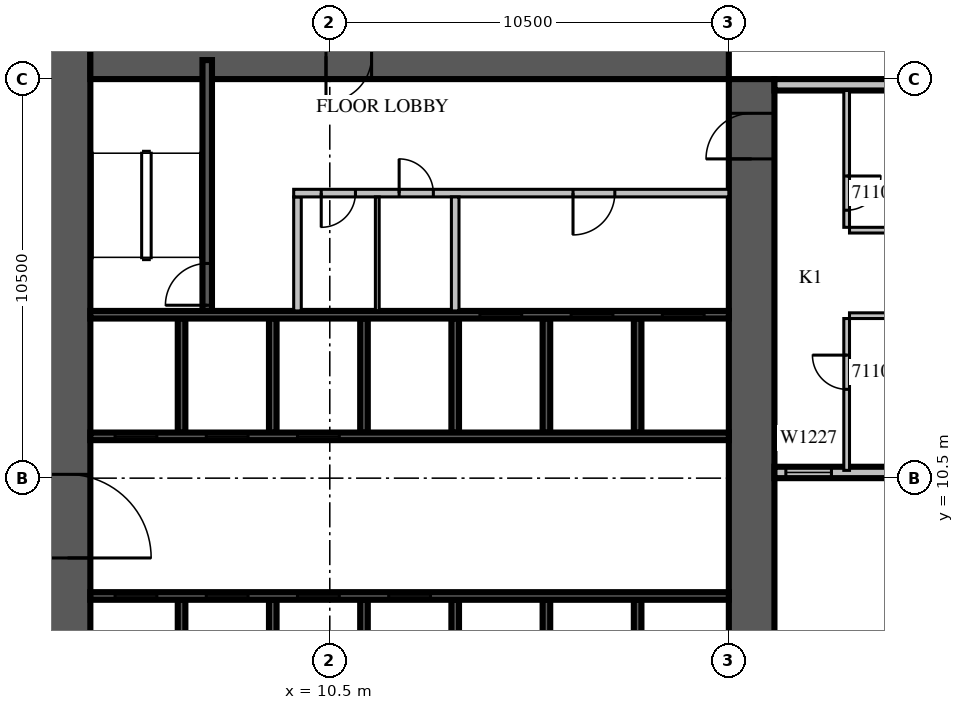
"""IFC4 building model, lengths in metres.
Left out: names, types, materials, properties, quantities, classifications, styles, units other than length and angle.
Written with IfcOpenShell. Run it as: python <this file> out.ifc"""

import sys

from ifc_helpers import new_model, si_unit, direction, frame, frame_2d, origin, place, context, subcontext, project, spatial, rectangle, extrude, source, transform, mapped, element, fill, save


model = new_model("IFC4")
c1 = context("Model", 3, precision=1e-05, world=origin(), true_north=direction((0.0, 1.0)))
c2 = subcontext(c1, "Body", "Model", "MODEL_VIEW")
j1 = project(units=[si_unit("LENGTHUNIT", "METRE"), si_unit("PLANEANGLEUNIT", "RADIAN")], contexts=[c1])
p1 = place(None, origin())
s1 = spatial("IfcSite", under=j1, at=p1, CompositionType="ELEMENT")
p2 = place(p1, origin())
s2 = spatial("IfcBuilding", under=s1, at=p2, CompositionType="ELEMENT")
p3 = place(p2, frame((0.0, 0.0, 57.3)))
s3 = spatial("IfcBuildingStorey", under=s2, at=p3, CompositionType="ELEMENT", Elevation=57.3)
m1 = source(origin(), c2, "Body", "SweptSolid", [
    extrude(rectangle(XDim=18.0, YDim=1.2, at=frame_2d((9.0, 0.0))), origin(), (0.0, 0.0, 1.0), 4.2),
])
p4 = place(p3, frame((3.6, 4.2, 0.0), z_axis=(0.0, 0.0, 1.0), x_axis=(0.0, 1.0, 0.0)))
e1 = element("IfcWall", 1, at=p4, inside=s3, PredefinedType="SHEAR", context=c2, shape_type="MappedRepresentation", body=[
    mapped(m1, transform((0.0, 0.0, 0.0), scale=1.0)),
])
m2 = source(origin(), c2, "Body", "SweptSolid", [
    extrude(rectangle(XDim=2.2, YDim=2.1, at=frame_2d((1.1, 1.05))), frame((0.0, 0.61, 0.0), z_axis=(0.0, -1.0, 0.0), x_axis=(1.0, 0.0, 0.0)), (0.0, 0.0, 1.0), 1.22),
])
p5 = place(p4, frame((4.2, 0.0, 0.0)))
e2 = element("IfcOpeningElement", 2, at=p5, cuts=e1, PredefinedType="OPENING", context=c2, shape_type="MappedRepresentation", body=[
    mapped(m2, transform((0.0, 0.0, 0.0), scale=1.0)),
])
m3 = source(origin(), c2, "Body", "SweptSolid", [
    extrude(rectangle(XDim=16.8, YDim=1.2, at=frame_2d((8.4, 0.0))), origin(), (0.0, 0.0, 1.0), 4.2),
])
p6 = place(p3, frame((21.6, 4.2, 0.0), z_axis=(0.0, 0.0, 1.0), x_axis=(0.0, 1.0, 0.0)))
e3 = element("IfcWall", 3, at=p6, inside=s3, PredefinedType="SHEAR", context=c2, shape_type="MappedRepresentation", body=[
    mapped(m3, transform((0.0, 0.0, 0.0), scale=1.0)),
])
m4 = source(origin(), c2, "Body", "SweptSolid", [
    extrude(rectangle(XDim=1.2, YDim=2.1, at=frame_2d((0.6, 1.05))), frame((0.0, 0.61, 0.0), z_axis=(0.0, -1.0, 0.0), x_axis=(1.0, 0.0, 0.0)), (0.0, 0.0, 1.0), 1.22),
])
p7 = place(p6, frame((14.7, 0.0, 0.0)))
e4 = element("IfcOpeningElement", 4, at=p7, cuts=e3, PredefinedType="OPENING", context=c2, shape_type="MappedRepresentation", body=[
    mapped(m4, transform((0.0, 0.0, 0.0), scale=1.0)),
])
p8 = place(p3, frame((4.2, 21.6, 0.0), z_axis=(0.0, 0.0, 1.0), x_axis=(1.0, 0.0, 0.0)))
e5 = element("IfcWall", 5, at=p8, inside=s3, PredefinedType="SHEAR", context=c2, shape_type="MappedRepresentation", body=[
    mapped(m3, transform((0.0, 0.0, 0.0), scale=1.0)),
])
p9 = place(p8, frame((6.2, 0.0, 0.0)))
e6 = element("IfcOpeningElement", 6, at=p9, cuts=e5, PredefinedType="OPENING", context=c2, shape_type="MappedRepresentation", body=[
    mapped(m4, transform((0.0, 0.0, 0.0), scale=1.0)),
])
m5 = source(origin(), c2, "Body", "SweptSolid", [
    extrude(rectangle(XDim=6.6, YDim=0.3, at=frame_2d((3.3, 0.0))), origin(), (0.0, 0.0, 1.0), 3.8),
])
p10 = place(p3, frame((22.2, 10.65, 0.0), z_axis=(0.0, 0.0, 1.0), x_axis=(1.0, 0.0, 0.0)))
e7 = element("IfcWall", 7, at=p10, inside=s3, PredefinedType="STANDARD", context=c2, shape_type="MappedRepresentation", body=[
    mapped(m5, transform((0.0, 0.0, 0.0), scale=1.0)),
])
m6 = source(origin(), c2, "Body", "SweptSolid", [
    extrude(rectangle(XDim=1.2, YDim=2.7, at=frame_2d((0.6, 1.35))), frame((0.0, 0.16, 0.0), z_axis=(0.0, -1.0, 0.0), x_axis=(1.0, 0.0, 0.0)), (0.0, 0.0, 1.0), 0.32),
])
p11 = place(p10, frame((0.3, 0.0, 0.6)))
e8 = element("IfcOpeningElement", 8, at=p11, cuts=e7, PredefinedType="OPENING", context=c2, shape_type="MappedRepresentation", body=[
    mapped(m6, transform((0.0, 0.0, 0.0), scale=1.0)),
])
m7 = source(origin(), c2, "Body", "SweptSolid", [
    extrude(rectangle(XDim=2.4, YDim=2.7, at=frame_2d((1.2, 1.35))), frame((0.0, 0.16, 0.0), z_axis=(0.0, -1.0, 0.0), x_axis=(1.0, 0.0, 0.0)), (0.0, 0.0, 1.0), 0.32),
])
p12 = place(p10, frame((3.9, 0.0, 0.6)))
e9 = element("IfcOpeningElement", 9, at=p12, cuts=e7, PredefinedType="OPENING", context=c2, shape_type="MappedRepresentation", body=[
    mapped(m7, transform((0.0, 0.0, 0.0), scale=1.0)),
])
p13 = place(p3, frame((28.8, 20.85, 0.0), z_axis=(0.0, 0.0, 1.0), x_axis=(-1.0, 0.0, 0.0)))
e10 = element("IfcWall", 10, at=p13, inside=s3, PredefinedType="STANDARD", context=c2, shape_type="MappedRepresentation", body=[
    mapped(m5, transform((0.0, 0.0, 0.0), scale=1.0)),
])
p14 = place(p13, frame((0.3, 0.0, 0.6)))
e11 = element("IfcOpeningElement", 11, at=p14, cuts=e10, PredefinedType="OPENING", context=c2, shape_type="MappedRepresentation", body=[
    mapped(m7, transform((0.0, 0.0, 0.0), scale=1.0)),
])
m8 = source(origin(), c2, "Body", "SweptSolid", [
    extrude(rectangle(XDim=3.1, YDim=0.2, at=frame_2d((1.55, 0.0))), origin(), (0.0, 0.0, 1.0), 4.2),
])
for number, where, z_axis, x_axis in (
    (12, (6.6, 4.2, 0.0), (0.0, 0.0, 1.0), (0.0, 1.0, 0.0)),
    (13, (9.0, 4.2, 0.0), (0.0, 0.0, 1.0), (0.0, 1.0, 0.0)),
    (14, (11.4, 4.2, 0.0), (0.0, 0.0, 1.0), (0.0, 1.0, 0.0)),
    (15, (13.8, 4.2, 0.0), (0.0, 0.0, 1.0), (0.0, 1.0, 0.0)),
    (16, (16.2, 4.2, 0.0), (0.0, 0.0, 1.0), (0.0, 1.0, 0.0)),
    (17, (18.6, 4.2, 0.0), (0.0, 0.0, 1.0), (0.0, 1.0, 0.0)),
):
    element("IfcWall", number, at=place(p3, frame(where, z_axis=z_axis, x_axis=x_axis)), inside=s3, PredefinedType="SOLIDWALL", context=c2, shape_type="MappedRepresentation", body=[
        mapped(m8, transform((0.0, 0.0, 0.0), scale=1.0)),
    ])
m9 = source(origin(), c2, "Body", "SweptSolid", [
    extrude(rectangle(XDim=3.0, YDim=0.2, at=frame_2d((1.5, 0.0))), origin(), (0.0, 0.0, 1.0), 4.2),
])
for number, where, z_axis, x_axis in (
    (18, (6.6, 11.7, 0.0), (0.0, 0.0, 1.0), (0.0, 1.0, 0.0)),
    (19, (9.0, 11.7, 0.0), (0.0, 0.0, 1.0), (0.0, 1.0, 0.0)),
    (20, (11.4, 11.7, 0.0), (0.0, 0.0, 1.0), (0.0, 1.0, 0.0)),
    (21, (13.8, 11.7, 0.0), (0.0, 0.0, 1.0), (0.0, 1.0, 0.0)),
    (22, (16.2, 11.7, 0.0), (0.0, 0.0, 1.0), (0.0, 1.0, 0.0)),
    (23, (18.6, 11.7, 0.0), (0.0, 0.0, 1.0), (0.0, 1.0, 0.0)),
):
    element("IfcWall", number, at=place(p3, frame(where, z_axis=z_axis, x_axis=x_axis)), inside=s3, PredefinedType="SOLIDWALL", context=c2, shape_type="MappedRepresentation", body=[
        mapped(m9, transform((0.0, 0.0, 0.0), scale=1.0)),
    ])
m10 = source(origin(), c2, "Body", "SweptSolid", [
    extrude(rectangle(XDim=16.8, YDim=0.2, at=frame_2d((8.4, 0.0))), origin(), (0.0, 0.0, 1.0), 4.2),
])
p15 = place(p3, frame((4.2, 7.4, 0.0), z_axis=(0.0, 0.0, 1.0), x_axis=(1.0, 0.0, 0.0)))
e24 = element("IfcWall", 24, at=p15, inside=s3, PredefinedType="SOLIDWALL", context=c2, shape_type="MappedRepresentation", body=[
    mapped(m10, transform((0.0, 0.0, 0.0), scale=1.0)),
])
m11 = source(origin(), c2, "Body", "SweptSolid", [
    extrude(rectangle(XDim=1.1, YDim=2.1, at=frame_2d((0.55, 1.05))), frame((0.0, 0.11, 0.0), z_axis=(0.0, -1.0, 0.0), x_axis=(1.0, 0.0, 0.0)), (0.0, 0.0, 1.0), 0.22),
])
p16 = place(p15, frame((0.65, 0.0, 0.0)))
e25 = element("IfcOpeningElement", 25, at=p16, cuts=e24, PredefinedType="OPENING", context=c2, shape_type="MappedRepresentation", body=[
    mapped(m11, transform((0.0, 0.0, 0.0), scale=1.0)),
])
p17 = place(p15, frame((3.05, 0.0, 0.0)))
e26 = element("IfcOpeningElement", 26, at=p17, cuts=e24, PredefinedType="OPENING", context=c2, shape_type="MappedRepresentation", body=[
    mapped(m11, transform((0.0, 0.0, 0.0), scale=1.0)),
])
p18 = place(p15, frame((5.45, 0.0, 0.0)))
e27 = element("IfcOpeningElement", 27, at=p18, cuts=e24, PredefinedType="OPENING", context=c2, shape_type="MappedRepresentation", body=[
    mapped(m11, transform((0.0, 0.0, 0.0), scale=1.0)),
])
p19 = place(p15, frame((7.85, 0.0, 0.0)))
e28 = element("IfcOpeningElement", 28, at=p19, cuts=e24, PredefinedType="OPENING", context=c2, shape_type="MappedRepresentation", body=[
    mapped(m11, transform((0.0, 0.0, 0.0), scale=1.0)),
])
p20 = place(p3, frame((4.2, 11.6, 0.0), z_axis=(0.0, 0.0, 1.0), x_axis=(1.0, 0.0, 0.0)))
e29 = element("IfcWall", 29, at=p20, inside=s3, PredefinedType="SOLIDWALL", context=c2, shape_type="MappedRepresentation", body=[
    mapped(m10, transform((0.0, 0.0, 0.0), scale=1.0)),
])
p21 = place(p20, frame((0.65, 0.0, 0.0)))
e30 = element("IfcOpeningElement", 30, at=p21, cuts=e29, PredefinedType="OPENING", context=c2, shape_type="MappedRepresentation", body=[
    mapped(m11, transform((0.0, 0.0, 0.0), scale=1.0)),
])
p22 = place(p20, frame((3.05, 0.0, 0.0)))
e31 = element("IfcOpeningElement", 31, at=p22, cuts=e29, PredefinedType="OPENING", context=c2, shape_type="MappedRepresentation", body=[
    mapped(m11, transform((0.0, 0.0, 0.0), scale=1.0)),
])
p23 = place(p20, frame((5.45, 0.0, 0.0)))
e32 = element("IfcOpeningElement", 32, at=p23, cuts=e29, PredefinedType="OPENING", context=c2, shape_type="MappedRepresentation", body=[
    mapped(m11, transform((0.0, 0.0, 0.0), scale=1.0)),
])
p24 = place(p3, frame((4.2, 14.8, 0.0), z_axis=(0.0, 0.0, 1.0), x_axis=(1.0, 0.0, 0.0)))
e33 = element("IfcWall", 33, at=p24, inside=s3, PredefinedType="SOLIDWALL", context=c2, shape_type="MappedRepresentation", body=[
    mapped(m10, transform((0.0, 0.0, 0.0), scale=1.0)),
])
p25 = place(p24, frame((10.25, 0.0, 0.0)))
e34 = element("IfcOpeningElement", 34, at=p25, cuts=e33, PredefinedType="OPENING", context=c2, shape_type="MappedRepresentation", body=[
    mapped(m11, transform((0.0, 0.0, 0.0), scale=1.0)),
])
p26 = place(p24, frame((12.65, 0.0, 0.0)))
e35 = element("IfcOpeningElement", 35, at=p26, cuts=e33, PredefinedType="OPENING", context=c2, shape_type="MappedRepresentation", body=[
    mapped(m11, transform((0.0, 0.0, 0.0), scale=1.0)),
])
p27 = place(p24, frame((15.05, 0.0, 0.0)))
e36 = element("IfcOpeningElement", 36, at=p27, cuts=e33, PredefinedType="OPENING", context=c2, shape_type="MappedRepresentation", body=[
    mapped(m11, transform((0.0, 0.0, 0.0), scale=1.0)),
])
m12 = source(origin(), c2, "Body", "SweptSolid", [
    extrude(rectangle(XDim=6.6, YDim=0.25, at=frame_2d((3.3, 0.0))), origin(), (0.0, 0.0, 1.0), 3.8),
])
p28 = place(p3, frame((7.275, 14.9, 0.0), z_axis=(0.0, 0.0, 1.0), x_axis=(0.0, 1.0, 0.0)))
e37 = element("IfcWall", 37, at=p28, inside=s3, PredefinedType="SOLIDWALL", context=c2, shape_type="MappedRepresentation", body=[
    mapped(m12, transform((0.0, 0.0, 0.0), scale=1.0)),
])
m13 = source(origin(), c2, "Body", "SweptSolid", [
    extrude(rectangle(XDim=1.1, YDim=2.1, at=frame_2d((0.55, 1.05))), frame((0.0, 0.135, 0.0), z_axis=(0.0, -1.0, 0.0), x_axis=(1.0, 0.0, 0.0)), (0.0, 0.0, 1.0), 0.27),
])
p29 = place(p28, frame((0.15, 0.0, 0.0)))
e38 = element("IfcOpeningElement", 38, at=p29, cuts=e37, PredefinedType="OPENING", context=c2, shape_type="MappedRepresentation", body=[
    mapped(m13, transform((0.0, 0.0, 0.0), scale=1.0)),
])
m14 = source(origin(), c2, "Body", "SweptSolid", [
    extrude(rectangle(XDim=3.0, YDim=0.2, at=frame_2d((1.5, 0.0))), origin(), (0.0, 0.0, 1.0), 3.8),
])
p30 = place(p3, frame((9.65, 14.9, 0.0), z_axis=(0.0, 0.0, 1.0), x_axis=(0.0, 1.0, 0.0)))
e39 = element("IfcWall", 39, at=p30, inside=s3, PredefinedType="PARTITIONING", context=c2, shape_type="MappedRepresentation", body=[
    mapped(m14, transform((0.0, 0.0, 0.0), scale=1.0)),
])
m15 = source(origin(), c2, "Body", "SweptSolid", [
    extrude(rectangle(XDim=11.45, YDim=0.2, at=frame_2d((5.725, 0.0))), origin(), (0.0, 0.0, 1.0), 3.8),
])
p31 = place(p3, frame((9.55, 18.0, 0.0), z_axis=(0.0, 0.0, 1.0), x_axis=(1.0, 0.0, 0.0)))
e40 = element("IfcWall", 40, at=p31, inside=s3, PredefinedType="PARTITIONING", context=c2, shape_type="MappedRepresentation", body=[
    mapped(m15, transform((0.0, 0.0, 0.0), scale=1.0)),
])
m16 = source(origin(), c2, "Body", "SweptSolid", [
    extrude(rectangle(XDim=0.9, YDim=2.1, at=frame_2d((0.45, 1.05))), frame((0.0, 0.11, 0.0), z_axis=(0.0, -1.0, 0.0), x_axis=(1.0, 0.0, 0.0)), (0.0, 0.0, 1.0), 0.22),
])
p32 = place(p31, frame((0.725, 0.0, 0.0)))
e41 = element("IfcOpeningElement", 41, at=p32, cuts=e40, PredefinedType="OPENING", context=c2, shape_type="MappedRepresentation", body=[
    mapped(m16, transform((0.0, 0.0, 0.0), scale=1.0)),
])
p33 = place(p31, frame((2.775, 0.0, 0.0)))
e42 = element("IfcOpeningElement", 42, at=p33, cuts=e40, PredefinedType="OPENING", context=c2, shape_type="MappedRepresentation", body=[
    mapped(m16, transform((0.0, 0.0, 0.0), scale=1.0)),
])
p34 = place(p31, frame((7.35, 0.0, 0.0)))
e43 = element("IfcOpeningElement", 43, at=p34, cuts=e40, PredefinedType="OPENING", context=c2, shape_type="MappedRepresentation", body=[
    mapped(m11, transform((0.0, 0.0, 0.0), scale=1.0)),
])
p35 = place(p3, frame((13.8, 14.9, 0.0), z_axis=(0.0, 0.0, 1.0), x_axis=(0.0, 1.0, 0.0)))
e44 = element("IfcWall", 44, at=p35, inside=s3, PredefinedType="PARTITIONING", context=c2, shape_type="MappedRepresentation", body=[
    mapped(m14, transform((0.0, 0.0, 0.0), scale=1.0)),
])
m17 = source(origin(), c2, "Body", "SweptSolid", [
    extrude(rectangle(XDim=3.0, YDim=0.1, at=frame_2d((1.5, 0.0))), origin(), (0.0, 0.0, 1.0), 3.8),
])
p36 = place(p3, frame((11.75, 14.9, 0.0), z_axis=(0.0, 0.0, 1.0), x_axis=(0.0, 1.0, 0.0)))
e45 = element("IfcWall", 45, at=p36, inside=s3, PredefinedType="PARTITIONING", context=c2, shape_type="MappedRepresentation", body=[
    mapped(m17, transform((0.0, 0.0, 0.0), scale=1.0)),
])
p37 = place(p3, frame((24.1, 14.7, 0.0), z_axis=(0.0, 0.0, 1.0), x_axis=(0.0, -1.0, 0.0)))
e46 = element("IfcWall", 46, at=p37, inside=s3, PredefinedType="PARTITIONING", context=c2, shape_type="SweptSolid", body=[
    extrude(rectangle(XDim=3.995, YDim=0.15, at=frame_2d((1.998, 0.0))), origin(), (0.0, 0.0, 1.0), 3.8),
])
m18 = source(origin(), c2, "Body", "SweptSolid", [
    extrude(rectangle(XDim=0.9, YDim=2.1, at=frame_2d((0.45, 1.05))), frame((0.0, 0.085, 0.0), z_axis=(0.0, -1.0, 0.0), x_axis=(1.0, 0.0, 0.0)), (0.0, 0.0, 1.0), 0.17),
])
p38 = place(p37, frame((0.963, 0.0, 0.0)))
e47 = element("IfcOpeningElement", 47, at=p38, cuts=e46, PredefinedType="OPENING", context=c2, shape_type="MappedRepresentation", body=[
    mapped(m18, transform((0.0, 0.0, 0.0), scale=1.0)),
])
m19 = source(origin(), c2, "Body", "SweptSolid", [
    extrude(rectangle(XDim=3.6, YDim=0.15, at=frame_2d((1.8, 0.0))), origin(), (0.0, 0.0, 1.0), 3.8),
])
p39 = place(p3, frame((24.1, 20.7, 0.0), z_axis=(0.0, 0.0, 1.0), x_axis=(0.0, -1.0, 0.0)))
e48 = element("IfcWall", 48, at=p39, inside=s3, PredefinedType="PARTITIONING", context=c2, shape_type="MappedRepresentation", body=[
    mapped(m19, transform((0.0, 0.0, 0.0), scale=1.0)),
])
p40 = place(p39, frame((2.25, 0.0, 0.0)))
e49 = element("IfcOpeningElement", 49, at=p40, cuts=e48, PredefinedType="OPENING", context=c2, shape_type="MappedRepresentation", body=[
    mapped(m18, transform((0.0, 0.0, 0.0), scale=1.0)),
])
m20 = source(origin(), c2, "Body", "SweptSolid", [
    extrude(rectangle(XDim=5.15, YDim=0.15, at=frame_2d((2.575, 0.0))), origin(), (0.0, 0.0, 1.0), 3.8),
])
for number, where, z_axis, x_axis in (
    (50, (29.325, 14.775, 0.0), (0.0, 0.0, 1.0), (-1.0, 0.0, 0.0)),
    (51, (24.175, 17.025, 0.0), (0.0, 0.0, 1.0), (1.0, 0.0, 0.0)),
):
    element("IfcWall", number, at=place(p3, frame(where, z_axis=z_axis, x_axis=x_axis)), inside=s3, PredefinedType="PARTITIONING", context=c2, shape_type="MappedRepresentation", body=[
        mapped(m20, transform((0.0, 0.0, 0.0), scale=1.0)),
    ])
m21 = source(origin(), c2, "Body", "SweptSolid", [
    extrude(rectangle(XDim=1.2, YDim=2.7, at=frame_2d((0.6, 1.35))), frame((0.0, 0.03, 0.0), z_axis=(0.0, -1.0, 0.0), x_axis=(1.0, 0.0, 0.0)), (0.0, 0.0, 1.0), 0.06),
])
p41 = place(p11, origin())
e52 = element("IfcWindow", 52, at=p41, inside=s3, PartitioningType="SINGLE_PANEL", PredefinedType="WINDOW", context=c2, shape_type="MappedRepresentation", body=[
    mapped(m21, transform((0.0, 0.0, 0.0), scale=1.0)),
])
fill(e8, e52)
m22 = source(origin(), c2, "Body", "SweptSolid", [
    extrude(rectangle(XDim=1.1, YDim=2.1, at=frame_2d((0.55, 1.05))), frame((0.0, 0.025, 0.0), z_axis=(0.0, -1.0, 0.0), x_axis=(1.0, 0.0, 0.0)), (0.0, 0.0, 1.0), 0.05),
])
p42 = place(p16, origin())
e53 = element("IfcDoor", 53, at=p42, inside=s3, OperationType="SLIDING_TO_LEFT", PredefinedType="DOOR", context=c2, shape_type="MappedRepresentation", body=[
    mapped(m22, transform((0.0, 0.0, 0.0), scale=1.0)),
])
fill(e25, e53)
p43 = place(p17, origin())
e54 = element("IfcDoor", 54, at=p43, inside=s3, OperationType="SLIDING_TO_LEFT", PredefinedType="DOOR", context=c2, shape_type="MappedRepresentation", body=[
    mapped(m22, transform((0.0, 0.0, 0.0), scale=1.0)),
])
fill(e26, e54)
p44 = place(p18, origin())
e55 = element("IfcDoor", 55, at=p44, inside=s3, OperationType="SLIDING_TO_LEFT", PredefinedType="DOOR", context=c2, shape_type="MappedRepresentation", body=[
    mapped(m22, transform((0.0, 0.0, 0.0), scale=1.0)),
])
fill(e27, e55)
p45 = place(p19, origin())
e56 = element("IfcDoor", 56, at=p45, inside=s3, OperationType="SLIDING_TO_LEFT", PredefinedType="DOOR", context=c2, shape_type="MappedRepresentation", body=[
    mapped(m22, transform((0.0, 0.0, 0.0), scale=1.0)),
])
fill(e28, e56)
p46 = place(p21, origin())
e57 = element("IfcDoor", 57, at=p46, inside=s3, OperationType="SLIDING_TO_LEFT", PredefinedType="DOOR", context=c2, shape_type="MappedRepresentation", body=[
    mapped(m22, transform((0.0, 0.0, 0.0), scale=1.0)),
])
fill(e30, e57)
p47 = place(p22, origin())
e58 = element("IfcDoor", 58, at=p47, inside=s3, OperationType="SLIDING_TO_LEFT", PredefinedType="DOOR", context=c2, shape_type="MappedRepresentation", body=[
    mapped(m22, transform((0.0, 0.0, 0.0), scale=1.0)),
])
fill(e31, e58)
p48 = place(p23, origin())
e59 = element("IfcDoor", 59, at=p48, inside=s3, OperationType="SLIDING_TO_LEFT", PredefinedType="DOOR", context=c2, shape_type="MappedRepresentation", body=[
    mapped(m22, transform((0.0, 0.0, 0.0), scale=1.0)),
])
fill(e32, e59)
p49 = place(p25, origin())
e60 = element("IfcDoor", 60, at=p49, inside=s3, OperationType="SLIDING_TO_LEFT", PredefinedType="DOOR", context=c2, shape_type="MappedRepresentation", body=[
    mapped(m22, transform((0.0, 0.0, 0.0), scale=1.0)),
])
fill(e34, e60)
p50 = place(p26, origin())
e61 = element("IfcDoor", 61, at=p50, inside=s3, OperationType="SLIDING_TO_LEFT", PredefinedType="DOOR", context=c2, shape_type="MappedRepresentation", body=[
    mapped(m22, transform((0.0, 0.0, 0.0), scale=1.0)),
])
fill(e35, e61)
p51 = place(p27, origin())
e62 = element("IfcDoor", 62, at=p51, inside=s3, OperationType="SLIDING_TO_LEFT", PredefinedType="DOOR", context=c2, shape_type="MappedRepresentation", body=[
    mapped(m22, transform((0.0, 0.0, 0.0), scale=1.0)),
])
fill(e36, e62)
p52 = place(p29, origin())
e63 = element("IfcDoor", 63, at=p52, inside=s3, OperationType="SINGLE_SWING_LEFT", PredefinedType="DOOR", context=c2, shape_type="MappedRepresentation", body=[
    mapped(m22, transform((0.0, 0.0, 0.0), scale=1.0)),
])
fill(e38, e63)
m23 = source(origin(), c2, "Body", "SweptSolid", [
    extrude(rectangle(XDim=0.9, YDim=2.1, at=frame_2d((0.45, 1.05))), frame((0.0, 0.025, 0.0), z_axis=(0.0, -1.0, 0.0), x_axis=(1.0, 0.0, 0.0)), (0.0, 0.0, 1.0), 0.05),
])
p53 = place(p32, origin())
e64 = element("IfcDoor", 64, at=p53, inside=s3, OperationType="SINGLE_SWING_RIGHT", PredefinedType="DOOR", context=c2, shape_type="MappedRepresentation", body=[
    mapped(m23, transform((0.0, 0.0, 0.0), scale=1.0)),
])
fill(e41, e64)
p54 = place(p33, origin())
e65 = element("IfcDoor", 65, at=p54, inside=s3, OperationType="SINGLE_SWING_LEFT", PredefinedType="DOOR", context=c2, shape_type="MappedRepresentation", body=[
    mapped(m23, transform((0.0, 0.0, 0.0), scale=1.0)),
])
fill(e42, e65)
p55 = place(p34, origin())
e66 = element("IfcDoor", 66, at=p55, inside=s3, OperationType="SINGLE_SWING_RIGHT", PredefinedType="DOOR", context=c2, shape_type="MappedRepresentation", body=[
    mapped(m22, transform((0.0, 0.0, 0.0), scale=1.0)),
])
fill(e43, e66)
m24 = source(origin(), c2, "Body", "SweptSolid", [
    extrude(rectangle(XDim=2.2, YDim=2.1, at=frame_2d((1.1, 1.05))), frame((0.0, 0.025, 0.0), z_axis=(0.0, -1.0, 0.0), x_axis=(1.0, 0.0, 0.0)), (0.0, 0.0, 1.0), 0.05),
])
p56 = place(p5, origin())
e67 = element("IfcDoor", 67, at=p56, inside=s3, OperationType="DOUBLE_DOOR_SINGLE_SWING", PredefinedType="DOOR", context=c2, shape_type="MappedRepresentation", body=[
    mapped(m24, transform((0.0, 0.0, 0.0), scale=1.0)),
])
fill(e2, e67)
m25 = source(origin(), c2, "Body", "SweptSolid", [
    extrude(rectangle(XDim=1.2, YDim=2.1, at=frame_2d((0.6, 1.05))), frame((0.0, 0.025, 0.0), z_axis=(0.0, -1.0, 0.0), x_axis=(1.0, 0.0, 0.0)), (0.0, 0.0, 1.0), 0.05),
])
p57 = place(p9, origin())
e68 = element("IfcDoor", 68, at=p57, inside=s3, OperationType="SINGLE_SWING_RIGHT", PredefinedType="DOOR", context=c2, shape_type="MappedRepresentation", body=[
    mapped(m25, transform((0.0, 0.0, 0.0), scale=1.0)),
])
fill(e6, e68)
p58 = place(p7, origin())
e69 = element("IfcDoor", 69, at=p58, inside=s3, OperationType="SINGLE_SWING_LEFT", PredefinedType="DOOR", context=c2, shape_type="MappedRepresentation", body=[
    mapped(m25, transform((0.0, 0.0, 0.0), scale=1.0)),
])
fill(e4, e69)
p59 = place(p38, origin())
e70 = element("IfcDoor", 70, at=p59, inside=s3, OperationType="SINGLE_SWING_RIGHT", PredefinedType="DOOR", context=c2, shape_type="MappedRepresentation", body=[
    mapped(m23, transform((0.0, 0.0, 0.0), scale=1.0)),
])
fill(e47, e70)
p60 = place(p40, origin())
e71 = element("IfcDoor", 71, at=p60, inside=s3, OperationType="SINGLE_SWING_LEFT", PredefinedType="DOOR", context=c2, shape_type="MappedRepresentation", body=[
    mapped(m23, transform((0.0, 0.0, 0.0), scale=1.0)),
])
fill(e49, e71)
save(model, sys.argv[1])
